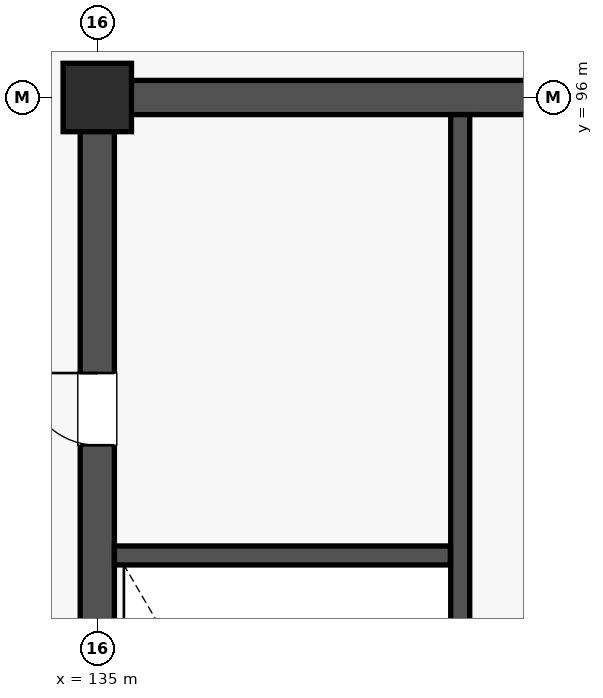
"""IFC4 building model, lengths in metres.
Left out: names, types, materials, properties, quantities, classifications, styles, units other than length and angle.
Written with IfcOpenShell. Run it as: python <this file> out.ifc"""

import sys

from ifc_helpers import new_model, si_unit, direction, frame, frame_2d, origin, origin_2d, place, context, subcontext, project, spatial, rectangle, extrude, element, fill, save


model = new_model("IFC4")
c1 = context("Model", 3, precision=1e-05, world=origin(), true_north=direction((0.0, 1.0)))
c2 = subcontext(c1, "Body", "Model", "MODEL_VIEW")
j1 = project(units=[si_unit("LENGTHUNIT", "METRE"), si_unit("PLANEANGLEUNIT", "RADIAN")], contexts=[c1])
p1 = place(None, origin())
s1 = spatial("IfcSite", under=j1, at=p1, CompositionType="ELEMENT")
p2 = place(p1, origin())
s2 = spatial("IfcBuilding", under=s1, at=p2, CompositionType="ELEMENT")
p3 = place(p2, origin())
s3 = spatial("IfcBuildingStorey", under=s2, at=p3, CompositionType="ELEMENT", Elevation=0.0)
p4 = place(p3, frame((135.0, 96.0, 0.0), z_axis=(0.0, 0.0, 1.0), x_axis=(1.0, 0.0, 0.0)))
e1 = element("IfcColumn", 1, at=p4, inside=s3, PredefinedType="COLUMN", context=c2, shape_type="SweptSolid", body=[
    extrude(rectangle(XDim=0.9, YDim=0.9, at=origin_2d()), origin(), (0.0, 0.0, 1.0), 4.5),
])
p5 = place(p3, frame((135.225, 96.0, 0.0), z_axis=(0.0, 0.0, 1.0), x_axis=(1.0, 0.0, 0.0)))
e2 = element("IfcWall", 2, at=p5, inside=s3, PredefinedType="SHEAR", context=c2, shape_type="SweptSolid", body=[
    extrude(rectangle(XDim=8.55, YDim=0.45, at=frame_2d((4.275, 0.0))), origin(), (0.0, 0.0, 1.0), 3.45),
])
p6 = place(p3, frame((135.0, 80.225, 0.0), z_axis=(0.0, 0.0, 1.0), x_axis=(0.0, 1.0, 0.0)))
e3 = element("IfcWall", 3, at=p6, inside=s3, PredefinedType="SHEAR", context=c2, shape_type="SweptSolid", body=[
    extrude(rectangle(XDim=15.55, YDim=0.45, at=frame_2d((7.775, 0.0))), origin(), (0.0, 0.0, 1.0), 3.45),
])
p7 = place(p6, frame((11.2, 0.0, 0.0)))
e4 = element("IfcOpeningElement", 4, at=p7, cuts=e3, PredefinedType="OPENING", context=c2, shape_type="SweptSolid", body=[
    extrude(rectangle(XDim=0.95, YDim=2.1, at=frame_2d((0.475, 1.05))), frame((0.0, 0.237, 0.0), z_axis=(0.0, -1.0, 0.0), x_axis=(1.0, 0.0, 0.0)), (0.0, 0.0, 1.0), 0.474),
])
p8 = place(p3, frame((139.775, 80.225, 0.0), z_axis=(0.0, 0.0, 1.0), x_axis=(0.0, 1.0, 0.0)))
e5 = element("IfcWall", 5, at=p8, inside=s3, PredefinedType="SOLIDWALL", context=c2, shape_type="SweptSolid", body=[
    extrude(rectangle(XDim=15.55, YDim=0.25, at=frame_2d((7.775, 0.0))), origin(), (0.0, 0.0, 1.0), 3.45),
])
p9 = place(p8, frame((0.45, 0.0, 0.0)))
e6 = element("IfcOpeningElement", 6, at=p9, cuts=e5, PredefinedType="OPENING", context=c2, shape_type="SweptSolid", body=[
    extrude(rectangle(XDim=1.1, YDim=2.15, at=frame_2d((0.55, 1.075))), frame((0.0, 0.137, 0.0), z_axis=(0.0, -1.0, 0.0), x_axis=(1.0, 0.0, 0.0)), (0.0, 0.0, 1.0), 0.274),
])
p10 = place(p3, frame((135.225, 89.975, 0.0), z_axis=(0.0, 0.0, 1.0), x_axis=(1.0, 0.0, 0.0)))
e7 = element("IfcWall", 7, at=p10, inside=s3, PredefinedType="SOLIDWALL", context=c2, shape_type="SweptSolid", body=[
    extrude(rectangle(XDim=4.42, YDim=0.25, at=frame_2d((2.21, 0.0))), origin(), (0.0, 0.0, 1.0), 3.45),
])
p11 = place(p7, origin())
e8 = element("IfcDoor", 8, at=p11, inside=s3, OperationType="SINGLE_SWING_RIGHT", PredefinedType="DOOR", context=c2, shape_type="SweptSolid", body=[
    extrude(rectangle(XDim=0.95, YDim=2.1, at=frame_2d((0.475, 1.05))), frame((0.0, 0.025, 0.0), z_axis=(0.0, -1.0, 0.0), x_axis=(1.0, 0.0, 0.0)), (0.0, 0.0, 1.0), 0.05),
])
fill(e4, e8)
save(model, sys.argv[1])
